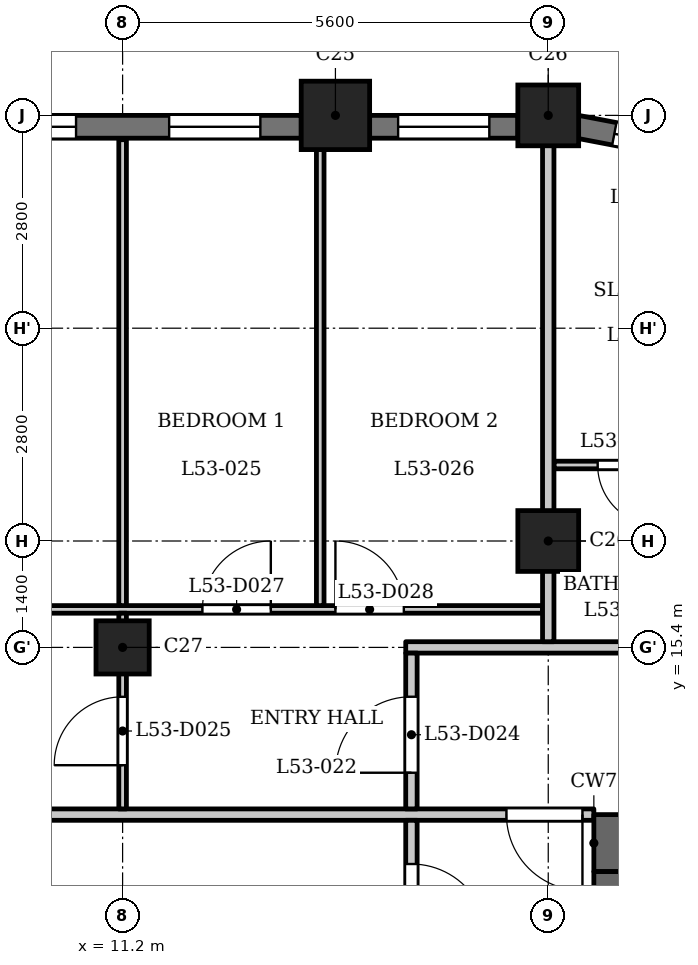
"""IFC4 building model, lengths in metres.
Left out: names, types, materials, properties, quantities, classifications, styles, units other than length and angle.
Written with IfcOpenShell. Run it as: python <this file> out.ifc"""

import sys

from ifc_helpers import new_model, si_unit, direction, frame, frame_2d, origin, origin_2d, place, context, subcontext, project, spatial, rectangle, extrude, element, fill, save


model = new_model("IFC4")
c1 = context("Model", 3, precision=1e-05, world=origin(), true_north=direction((0.0, 1.0)))
c2 = subcontext(c1, "Body", "Model", "MODEL_VIEW")
j1 = project(units=[si_unit("LENGTHUNIT", "METRE"), si_unit("PLANEANGLEUNIT", "RADIAN")], contexts=[c1])
p1 = place(None, origin())
s1 = spatial("IfcSite", under=j1, at=p1, CompositionType="ELEMENT")
p2 = place(p1, origin())
s2 = spatial("IfcBuilding", under=s1, at=p2, CompositionType="ELEMENT")
p3 = place(p2, frame((0.0, 0.0, 206.4)))
s3 = spatial("IfcBuildingStorey", under=s2, at=p3, CompositionType="ELEMENT", Elevation=206.4)
p4 = place(p3, frame((14.0, 22.4, 0.0), z_axis=(0.0, 0.0, 1.0), x_axis=(1.0, 0.0, 0.0)))
e1 = element("IfcColumn", 1, at=p4, inside=s3, PredefinedType="COLUMN", context=c2, shape_type="SweptSolid", body=[
    extrude(rectangle(XDim=0.9, YDim=0.9, at=origin_2d()), origin(), (0.0, 0.0, 1.0), 3.5),
])
for number, where, z_axis, x_axis in (
    (2, (16.8, 16.8, 0.0), (0.0, 0.0, 1.0), (1.0, 0.0, 0.0)),
    (3, (16.8, 22.4, 0.0), (0.0, 0.0, 1.0), (1.0, 0.0, 0.0)),
):
    element("IfcColumn", number, at=place(p3, frame(where, z_axis=z_axis, x_axis=x_axis)), inside=s3, PredefinedType="COLUMN", context=c2, shape_type="SweptSolid", body=[
        extrude(rectangle(XDim=0.8, YDim=0.8, at=origin_2d()), origin(), (0.0, 0.0, 1.0), 3.5),
    ])
p5 = place(p3, frame((11.2, 15.4, 0.0), z_axis=(0.0, 0.0, 1.0), x_axis=(1.0, 0.0, 0.0)))
e4 = element("IfcColumn", 4, at=p5, inside=s3, PredefinedType="COLUMN", context=c2, shape_type="SweptSolid", body=[
    extrude(rectangle(XDim=0.7, YDim=0.7, at=origin_2d()), origin(), (0.0, 0.0, 1.0), 3.5),
])
p6 = place(p3, frame((18.946, 21.914, 0.0), z_axis=(0.0, 0.0, 1.0), x_axis=(-0.98230529033, 0.187286722942, 0.0)))
e5 = element("IfcWall", 5, at=p6, inside=s3, PredefinedType="SOLIDWALL", context=c2, shape_type="SweptSolid", body=[
    extrude(rectangle(XDim=1.799, YDim=0.3, at=frame_2d((0.899, 0.0))), origin(), (0.0, 0.0, 1.0), 2.5),
])
p7 = place(p6, frame((0.5, 0.0, 0.6)))
e6 = element("IfcOpeningElement", 6, at=p7, cuts=e5, PredefinedType="OPENING", context=c2, shape_type="SweptSolid", body=[
    extrude(rectangle(XDim=0.8, YDim=1.55, at=frame_2d((0.4, 0.775))), frame((0.0, 0.16, 0.0), z_axis=(0.0, -1.0, 0.0), x_axis=(1.0, 0.0, 0.0)), (0.0, 0.0, 1.0), 0.32),
])
p8 = place(p3, frame((16.4, 22.25, 0.0), z_axis=(0.0, 0.0, 1.0), x_axis=(-1.0, 0.0, 0.0)))
e7 = element("IfcWall", 7, at=p8, inside=s3, PredefinedType="SOLIDWALL", context=c2, shape_type="SweptSolid", body=[
    extrude(rectangle(XDim=1.95, YDim=0.3, at=frame_2d((0.975, 0.0))), origin(), (0.0, 0.0, 1.0), 2.5),
])
p9 = place(p8, frame((0.375, 0.0, 0.6)))
e8 = element("IfcOpeningElement", 8, at=p9, cuts=e7, PredefinedType="OPENING", context=c2, shape_type="SweptSolid", body=[
    extrude(rectangle(XDim=1.2, YDim=1.55, at=frame_2d((0.6, 0.775))), frame((0.0, 0.16, 0.0), z_axis=(0.0, -1.0, 0.0), x_axis=(1.0, 0.0, 0.0)), (0.0, 0.0, 1.0), 0.32),
])
p10 = place(p3, frame((13.55, 22.25, 0.0), z_axis=(0.0, 0.0, 1.0), x_axis=(-1.0, 0.0, 0.0)))
e9 = element("IfcWall", 9, at=p10, inside=s3, PredefinedType="SOLIDWALL", context=c2, shape_type="SweptSolid", body=[
    extrude(rectangle(XDim=4.7, YDim=0.3, at=frame_2d((2.35, 0.0))), origin(), (0.0, 0.0, 1.0), 2.5),
])
p11 = place(p10, frame((0.538, 0.0, 0.6)))
e10 = element("IfcOpeningElement", 10, at=p11, cuts=e9, PredefinedType="OPENING", context=c2, shape_type="SweptSolid", body=[
    extrude(rectangle(XDim=1.2, YDim=1.55, at=frame_2d((0.6, 0.775))), frame((0.0, 0.16, 0.0), z_axis=(0.0, -1.0, 0.0), x_axis=(1.0, 0.0, 0.0)), (0.0, 0.0, 1.0), 0.32),
])
p12 = place(p10, frame((2.962, 0.0, 0.6)))
e11 = element("IfcOpeningElement", 11, at=p12, cuts=e9, PredefinedType="OPENING", context=c2, shape_type="SweptSolid", body=[
    extrude(rectangle(XDim=1.2, YDim=1.55, at=frame_2d((0.6, 0.775))), frame((0.0, 0.16, 0.0), z_axis=(0.0, -1.0, 0.0), x_axis=(1.0, 0.0, 0.0)), (0.0, 0.0, 1.0), 0.32),
])
p13 = place(p3, frame((17.4, 12.825, 0.0), z_axis=(0.0, 0.0, 1.0), x_axis=(1.0, 0.0, 0.0)))
e12 = element("IfcWall", 12, at=p13, inside=s3, PredefinedType="SHEAR", context=c2, shape_type="SweptSolid", body=[
    extrude(rectangle(XDim=7.6, YDim=0.75, at=frame_2d((3.8, 0.0))), origin(), (0.0, 0.0, 1.0), 3.2),
])
p14 = place(p3, frame((17.6, -12.45, 0.0), z_axis=(0.0, 0.0, 1.0), x_axis=(0.0, 1.0, 0.0)))
e13 = element("IfcWall", 13, at=p14, inside=s3, PredefinedType="SHEAR", context=c2, shape_type="SweptSolid", body=[
    extrude(rectangle(XDim=24.9, YDim=0.4, at=frame_2d((12.45, 0.0))), origin(), (0.0, 0.0, 1.0), 3.2),
])
p15 = place(p14, frame((8.65, 0.0, 0.0)))
e14 = element("IfcOpeningElement", 14, at=p15, cuts=e13, PredefinedType="OPENING", context=c2, shape_type="SweptSolid", body=[
    extrude(rectangle(XDim=0.9, YDim=2.1, at=frame_2d((0.45, 1.05))), frame((0.0, 0.21, 0.0), z_axis=(0.0, -1.0, 0.0), x_axis=(1.0, 0.0, 0.0)), (0.0, 0.0, 1.0), 0.42),
])
p16 = place(p14, frame((15.6, 0.0, 0.0)))
e15 = element("IfcOpeningElement", 15, at=p16, cuts=e13, PredefinedType="OPENING", context=c2, shape_type="SweptSolid", body=[
    extrude(rectangle(XDim=1.1, YDim=2.1, at=frame_2d((0.55, 1.05))), frame((0.0, 0.21, 0.0), z_axis=(0.0, -1.0, 0.0), x_axis=(1.0, 0.0, 0.0)), (0.0, 0.0, 1.0), 0.42),
])
p17 = place(p14, frame((18.0, 0.0, 0.0)))
e16 = element("IfcOpeningElement", 16, at=p17, cuts=e13, PredefinedType="OPENING", context=c2, shape_type="SweptSolid", body=[
    extrude(rectangle(XDim=1.1, YDim=2.1, at=frame_2d((0.55, 1.05))), frame((0.0, 0.21, 0.0), z_axis=(0.0, -1.0, 0.0), x_axis=(1.0, 0.0, 0.0)), (0.0, 0.0, 1.0), 0.42),
])
p18 = place(p14, frame((23.025, 0.0, 0.0)))
e17 = element("IfcOpeningElement", 17, at=p18, cuts=e13, PredefinedType="OPENING", context=c2, shape_type="SweptSolid", body=[
    extrude(rectangle(XDim=1.1, YDim=2.1, at=frame_2d((0.55, 1.05))), frame((0.0, 0.21, 0.0), z_axis=(0.0, -1.0, 0.0), x_axis=(1.0, 0.0, 0.0)), (0.0, 0.0, 1.0), 0.42),
])
p19 = place(p14, frame((0.775, 0.0, 0.0)))
e18 = element("IfcOpeningElement", 18, at=p19, cuts=e13, PredefinedType="OPENING", context=c2, shape_type="SweptSolid", body=[
    extrude(rectangle(XDim=1.1, YDim=2.1, at=frame_2d((0.55, 1.05))), frame((0.0, 0.21, 0.0), z_axis=(0.0, -1.0, 0.0), x_axis=(1.0, 0.0, 0.0)), (0.0, 0.0, 1.0), 0.42),
])
p20 = place(p14, frame((12.925, 0.0, 0.0)))
e19 = element("IfcOpeningElement", 19, at=p20, cuts=e13, PredefinedType="OPENING", context=c2, shape_type="SweptSolid", body=[
    extrude(rectangle(XDim=1.8, YDim=2.1, at=frame_2d((0.9, 1.05))), frame((0.0, 0.21, 0.0), z_axis=(0.0, -1.0, 0.0), x_axis=(1.0, 0.0, 0.0)), (0.0, 0.0, 1.0), 0.42),
])
p21 = place(p3, frame((-17.4, 13.2, 0.0), z_axis=(0.0, 0.0, 1.0), x_axis=(1.0, 0.0, 0.0)))
e20 = element("IfcWall", 20, at=p21, inside=s3, PredefinedType="PARTITIONING", context=c2, shape_type="SweptSolid", body=[
    extrude(rectangle(XDim=34.8, YDim=0.15, at=frame_2d((17.4, 0.0))), origin(), (0.0, 0.0, 1.0), 3.2),
])
p22 = place(p21, frame((0.25, 0.0, 0.0)))
e21 = element("IfcOpeningElement", 21, at=p22, cuts=e20, PredefinedType="OPENING", context=c2, shape_type="SweptSolid", body=[
    extrude(rectangle(XDim=1.0, YDim=2.1, at=frame_2d((0.5, 1.05))), frame((0.0, 0.085, 0.0), z_axis=(0.0, -1.0, 0.0), x_axis=(1.0, 0.0, 0.0)), (0.0, 0.0, 1.0), 0.17),
])
p23 = place(p21, frame((33.65, 0.0, 0.0)))
e22 = element("IfcOpeningElement", 22, at=p23, cuts=e20, PredefinedType="OPENING", context=c2, shape_type="SweptSolid", body=[
    extrude(rectangle(XDim=1.0, YDim=2.1, at=frame_2d((0.5, 1.05))), frame((0.0, 0.085, 0.0), z_axis=(0.0, -1.0, 0.0), x_axis=(1.0, 0.0, 0.0)), (0.0, 0.0, 1.0), 0.17),
])
p24 = place(p3, frame((14.925, 15.4, 0.0), z_axis=(0.0, 0.0, 1.0), x_axis=(1.0, 0.0, 0.0)))
e23 = element("IfcWall", 23, at=p24, inside=s3, PredefinedType="PARTITIONING", context=c2, shape_type="SweptSolid", body=[
    extrude(rectangle(XDim=9.759, YDim=0.15, at=frame_2d((4.879, 0.0))), origin(), (0.0, 0.0, 1.0), 3.2),
])
p25 = place(p24, frame((7.616, 0.0, 0.0)))
e24 = element("IfcOpeningElement", 24, at=p25, cuts=e23, PredefinedType="OPENING", context=c2, shape_type="SweptSolid", body=[
    extrude(rectangle(XDim=1.0, YDim=2.1, at=frame_2d((0.5, 1.05))), frame((0.0, 0.085, 0.0), z_axis=(0.0, -1.0, 0.0), x_axis=(1.0, 0.0, 0.0)), (0.0, 0.0, 1.0), 0.17),
])
p26 = place(p3, frame((-16.725, 15.9, 0.0), z_axis=(0.0, 0.0, 1.0), x_axis=(1.0, 0.0, 0.0)))
e25 = element("IfcWall", 25, at=p26, inside=s3, PredefinedType="PARTITIONING", context=c2, shape_type="SweptSolid", body=[
    extrude(rectangle(XDim=33.45, YDim=0.1, at=frame_2d((16.725, 0.0))), origin(), (0.0, 0.0, 1.0), 3.2),
])
p27 = place(p26, frame((1.875, 0.0, 0.0)))
e26 = element("IfcOpeningElement", 26, at=p27, cuts=e25, PredefinedType="OPENING", context=c2, shape_type="SweptSolid", body=[
    extrude(rectangle(XDim=0.9, YDim=2.1, at=frame_2d((0.45, 1.05))), frame((0.0, 0.06, 0.0), z_axis=(0.0, -1.0, 0.0), x_axis=(1.0, 0.0, 0.0)), (0.0, 0.0, 1.0), 0.12),
])
p28 = place(p26, frame((3.975, 0.0, 0.0)))
e27 = element("IfcOpeningElement", 27, at=p28, cuts=e25, PredefinedType="OPENING", context=c2, shape_type="SweptSolid", body=[
    extrude(rectangle(XDim=0.9, YDim=2.1, at=frame_2d((0.45, 1.05))), frame((0.0, 0.06, 0.0), z_axis=(0.0, -1.0, 0.0), x_axis=(1.0, 0.0, 0.0)), (0.0, 0.0, 1.0), 0.12),
])
p29 = place(p26, frame((6.825, 0.0, 0.0)))
e28 = element("IfcOpeningElement", 28, at=p29, cuts=e25, PredefinedType="OPENING", context=c2, shape_type="SweptSolid", body=[
    extrude(rectangle(XDim=0.9, YDim=2.1, at=frame_2d((0.45, 1.05))), frame((0.0, 0.06, 0.0), z_axis=(0.0, -1.0, 0.0), x_axis=(1.0, 0.0, 0.0)), (0.0, 0.0, 1.0), 0.12),
])
p30 = place(p26, frame((28.975, 0.0, 0.0)))
e29 = element("IfcOpeningElement", 29, at=p30, cuts=e25, PredefinedType="OPENING", context=c2, shape_type="SweptSolid", body=[
    extrude(rectangle(XDim=0.9, YDim=2.1, at=frame_2d((0.45, 1.05))), frame((0.0, 0.06, 0.0), z_axis=(0.0, -1.0, 0.0), x_axis=(1.0, 0.0, 0.0)), (0.0, 0.0, 1.0), 0.12),
])
p31 = place(p26, frame((30.725, 0.0, 0.0)))
e30 = element("IfcOpeningElement", 30, at=p31, cuts=e25, PredefinedType="OPENING", context=c2, shape_type="SweptSolid", body=[
    extrude(rectangle(XDim=0.9, YDim=2.1, at=frame_2d((0.45, 1.05))), frame((0.0, 0.06, 0.0), z_axis=(0.0, -1.0, 0.0), x_axis=(1.0, 0.0, 0.0)), (0.0, 0.0, 1.0), 0.12),
])
p32 = place(p26, frame((25.625, 0.0, 0.0)))
e31 = element("IfcOpeningElement", 31, at=p32, cuts=e25, PredefinedType="OPENING", context=c2, shape_type="SweptSolid", body=[
    extrude(rectangle(XDim=0.9, YDim=2.1, at=frame_2d((0.45, 1.05))), frame((0.0, 0.06, 0.0), z_axis=(0.0, -1.0, 0.0), x_axis=(1.0, 0.0, 0.0)), (0.0, 0.0, 1.0), 0.12),
])
p33 = place(p3, frame((16.875, 17.8, 0.0), z_axis=(0.0, 0.0, 1.0), x_axis=(1.0, 0.0, 0.0)))
e32 = element("IfcWall", 32, at=p33, inside=s3, PredefinedType="PARTITIONING", context=c2, shape_type="SweptSolid", body=[
    extrude(rectangle(XDim=6.719, YDim=0.1, at=frame_2d((3.359, 0.0))), origin(), (0.0, 0.0, 1.0), 3.2),
])
p34 = place(p33, frame((0.575, 0.0, 0.0)))
e33 = element("IfcOpeningElement", 33, at=p34, cuts=e32, PredefinedType="OPENING", context=c2, shape_type="SweptSolid", body=[
    extrude(rectangle(XDim=0.8, YDim=2.1, at=frame_2d((0.4, 1.05))), frame((0.0, 0.06, 0.0), z_axis=(0.0, -1.0, 0.0), x_axis=(1.0, 0.0, 0.0)), (0.0, 0.0, 1.0), 0.12),
])
p35 = place(p33, frame((4.693, 0.0, 0.0)))
e34 = element("IfcOpeningElement", 34, at=p35, cuts=e32, PredefinedType="OPENING", context=c2, shape_type="SweptSolid", body=[
    extrude(rectangle(XDim=0.9, YDim=2.1, at=frame_2d((0.45, 1.05))), frame((0.0, 0.06, 0.0), z_axis=(0.0, -1.0, 0.0), x_axis=(1.0, 0.0, 0.0)), (0.0, 0.0, 1.0), 0.12),
])
p36 = place(p3, frame((11.2, 13.275, 0.0), z_axis=(0.0, 0.0, 1.0), x_axis=(0.0, 1.0, 0.0)))
e35 = element("IfcWall", 35, at=p36, inside=s3, PredefinedType="PARTITIONING", context=c2, shape_type="SweptSolid", body=[
    extrude(rectangle(XDim=2.575, YDim=0.1, at=frame_2d((1.288, 0.0))), origin(), (0.0, 0.0, 1.0), 3.2),
])
p37 = place(p36, frame((0.575, 0.0, 0.0)))
e36 = element("IfcOpeningElement", 36, at=p37, cuts=e35, PredefinedType="OPENING", context=c2, shape_type="SweptSolid", body=[
    extrude(rectangle(XDim=0.9, YDim=2.1, at=frame_2d((0.45, 1.05))), frame((0.0, 0.06, 0.0), z_axis=(0.0, -1.0, 0.0), x_axis=(1.0, 0.0, 0.0)), (0.0, 0.0, 1.0), 0.12),
])
p38 = place(p3, frame((11.2, 15.95, 0.0), z_axis=(0.0, 0.0, 1.0), x_axis=(0.0, 1.0, 0.0)))
e37 = element("IfcWall", 37, at=p38, inside=s3, PredefinedType="PARTITIONING", context=c2, shape_type="SweptSolid", body=[
    extrude(rectangle(XDim=6.13, YDim=0.1, at=frame_2d((3.065, 0.0))), origin(), (0.0, 0.0, 1.0), 3.2),
])
p39 = place(p3, frame((13.8, 15.95, 0.0), z_axis=(0.0, 0.0, 1.0), x_axis=(0.0, 1.0, 0.0)))
e38 = element("IfcWall", 38, at=p39, inside=s3, PredefinedType="PARTITIONING", context=c2, shape_type="SweptSolid", body=[
    extrude(rectangle(XDim=6.88, YDim=0.1, at=frame_2d((3.44, 0.0))), origin(), (0.0, 0.0, 1.0), 3.2),
])
p40 = place(p3, frame((15.0, 6.769, 0.0), z_axis=(0.0, 0.0, 1.0), x_axis=(0.0, 1.0, 0.0)))
e39 = element("IfcWall", 39, at=p40, inside=s3, PredefinedType="PARTITIONING", context=c2, shape_type="SweptSolid", body=[
    extrude(rectangle(XDim=6.356, YDim=0.15, at=frame_2d((3.178, 0.0))), origin(), (0.0, 0.0, 1.0), 3.2),
])
p41 = place(p40, frame((4.781, 0.0, 0.0)))
e40 = element("IfcOpeningElement", 40, at=p41, cuts=e39, PredefinedType="OPENING", context=c2, shape_type="SweptSolid", body=[
    extrude(rectangle(XDim=1.0, YDim=2.1, at=frame_2d((0.5, 1.05))), frame((0.0, 0.085, 0.0), z_axis=(0.0, -1.0, 0.0), x_axis=(1.0, 0.0, 0.0)), (0.0, 0.0, 1.0), 0.17),
])
p42 = place(p3, frame((15.0, 13.275, 0.0), z_axis=(0.0, 0.0, 1.0), x_axis=(0.0, 1.0, 0.0)))
e41 = element("IfcWall", 41, at=p42, inside=s3, PredefinedType="PARTITIONING", context=c2, shape_type="SweptSolid", body=[
    extrude(rectangle(XDim=2.05, YDim=0.15, at=frame_2d((1.025, 0.0))), origin(), (0.0, 0.0, 1.0), 3.2),
])
p43 = place(p42, frame((0.476, 0.0, 0.0)))
e42 = element("IfcOpeningElement", 42, at=p43, cuts=e41, PredefinedType="OPENING", context=c2, shape_type="SweptSolid", body=[
    extrude(rectangle(XDim=1.0, YDim=2.1, at=frame_2d((0.5, 1.05))), frame((0.0, 0.085, 0.0), z_axis=(0.0, -1.0, 0.0), x_axis=(1.0, 0.0, 0.0)), (0.0, 0.0, 1.0), 0.17),
])
p44 = place(p3, frame((16.8, 15.475, 0.0), z_axis=(0.0, 0.0, 1.0), x_axis=(0.0, 1.0, 0.0)))
e43 = element("IfcWall", 43, at=p44, inside=s3, PredefinedType="PARTITIONING", context=c2, shape_type="SweptSolid", body=[
    extrude(rectangle(XDim=6.835, YDim=0.15, at=frame_2d((3.417, 0.0))), origin(), (0.0, 0.0, 1.0), 2.55),
])
p45 = place(p41, origin())
e44 = element("IfcDoor", 44, at=p45, inside=s3, OperationType="SINGLE_SWING_LEFT", PredefinedType="DOOR", context=c2, shape_type="SweptSolid", body=[
    extrude(rectangle(XDim=1.0, YDim=2.1, at=frame_2d((0.5, 1.05))), frame((0.0, 0.025, 0.0), z_axis=(0.0, -1.0, 0.0), x_axis=(1.0, 0.0, 0.0)), (0.0, 0.0, 1.0), 0.05),
])
fill(e40, e44)
p46 = place(p23, origin())
e45 = element("IfcDoor", 45, at=p46, inside=s3, OperationType="SINGLE_SWING_RIGHT", PredefinedType="DOOR", context=c2, shape_type="SweptSolid", body=[
    extrude(rectangle(XDim=1.0, YDim=2.1, at=frame_2d((0.5, 1.05))), frame((0.0, 0.025, 0.0), z_axis=(0.0, -1.0, 0.0), x_axis=(1.0, 0.0, 0.0)), (0.0, 0.0, 1.0), 0.05),
])
fill(e22, e45)
p47 = place(p43, origin())
e46 = element("IfcDoor", 46, at=p47, inside=s3, OperationType="SINGLE_SWING_RIGHT", PredefinedType="DOOR", context=c2, shape_type="SweptSolid", body=[
    extrude(rectangle(XDim=1.0, YDim=2.1, at=frame_2d((0.5, 1.05))), frame((0.0, 0.025, 0.0), z_axis=(0.0, -1.0, 0.0), x_axis=(1.0, 0.0, 0.0)), (0.0, 0.0, 1.0), 0.05),
])
fill(e42, e46)
p48 = place(p37, origin())
e47 = element("IfcDoor", 47, at=p48, inside=s3, OperationType="SINGLE_SWING_RIGHT", PredefinedType="DOOR", context=c2, shape_type="SweptSolid", body=[
    extrude(rectangle(XDim=0.9, YDim=2.1, at=frame_2d((0.45, 1.05))), frame((0.0, 0.025, 0.0), z_axis=(0.0, -1.0, 0.0), x_axis=(1.0, 0.0, 0.0)), (0.0, 0.0, 1.0), 0.05),
])
fill(e36, e47)
p49 = place(p30, origin())
e48 = element("IfcDoor", 48, at=p49, inside=s3, OperationType="SINGLE_SWING_LEFT", PredefinedType="DOOR", context=c2, shape_type="SweptSolid", body=[
    extrude(rectangle(XDim=0.9, YDim=2.1, at=frame_2d((0.45, 1.05))), frame((0.0, 0.025, 0.0), z_axis=(0.0, -1.0, 0.0), x_axis=(1.0, 0.0, 0.0)), (0.0, 0.0, 1.0), 0.05),
])
fill(e29, e48)
p50 = place(p31, origin())
e49 = element("IfcDoor", 49, at=p50, inside=s3, OperationType="SINGLE_SWING_RIGHT", PredefinedType="DOOR", context=c2, shape_type="SweptSolid", body=[
    extrude(rectangle(XDim=0.9, YDim=2.1, at=frame_2d((0.45, 1.05))), frame((0.0, 0.025, 0.0), z_axis=(0.0, -1.0, 0.0), x_axis=(1.0, 0.0, 0.0)), (0.0, 0.0, 1.0), 0.05),
])
fill(e30, e49)
p51 = place(p34, origin())
e50 = element("IfcDoor", 50, at=p51, inside=s3, OperationType="SINGLE_SWING_RIGHT", PredefinedType="DOOR", context=c2, shape_type="SweptSolid", body=[
    extrude(rectangle(XDim=0.8, YDim=2.1, at=frame_2d((0.4, 1.05))), frame((0.0, 0.025, 0.0), z_axis=(0.0, -1.0, 0.0), x_axis=(1.0, 0.0, 0.0)), (0.0, 0.0, 1.0), 0.05),
])
fill(e33, e50)
p52 = place(p7, origin())
e51 = element("IfcWindow", 51, at=p52, inside=s3, PartitioningType="SINGLE_PANEL", PredefinedType="WINDOW", context=c2, shape_type="SweptSolid", body=[
    extrude(rectangle(XDim=0.8, YDim=1.55, at=frame_2d((0.4, 0.775))), frame((0.0, 0.03, 0.0), z_axis=(0.0, -1.0, 0.0), x_axis=(1.0, 0.0, 0.0)), (0.0, 0.0, 1.0), 0.06),
])
fill(e6, e51)
p53 = place(p9, origin())
e52 = element("IfcWindow", 52, at=p53, inside=s3, PartitioningType="SINGLE_PANEL", PredefinedType="WINDOW", context=c2, shape_type="SweptSolid", body=[
    extrude(rectangle(XDim=1.2, YDim=1.55, at=frame_2d((0.6, 0.775))), frame((0.0, 0.03, 0.0), z_axis=(0.0, -1.0, 0.0), x_axis=(1.0, 0.0, 0.0)), (0.0, 0.0, 1.0), 0.06),
])
fill(e8, e52)
p54 = place(p11, origin())
e53 = element("IfcWindow", 53, at=p54, inside=s3, PartitioningType="SINGLE_PANEL", PredefinedType="WINDOW", context=c2, shape_type="SweptSolid", body=[
    extrude(rectangle(XDim=1.2, YDim=1.55, at=frame_2d((0.6, 0.775))), frame((0.0, 0.03, 0.0), z_axis=(0.0, -1.0, 0.0), x_axis=(1.0, 0.0, 0.0)), (0.0, 0.0, 1.0), 0.06),
])
fill(e10, e53)
p55 = place(p12, origin())
e54 = element("IfcWindow", 54, at=p55, inside=s3, PartitioningType="SINGLE_PANEL", PredefinedType="WINDOW", context=c2, shape_type="SweptSolid", body=[
    extrude(rectangle(XDim=1.2, YDim=1.55, at=frame_2d((0.6, 0.775))), frame((0.0, 0.03, 0.0), z_axis=(0.0, -1.0, 0.0), x_axis=(1.0, 0.0, 0.0)), (0.0, 0.0, 1.0), 0.06),
])
fill(e11, e54)
save(model, sys.argv[1])
